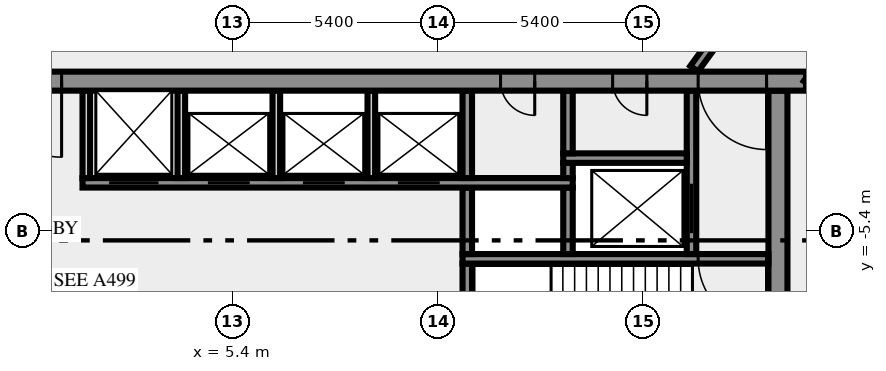
"""IFC4 building model, lengths in metres.
Left out: names, types, materials, properties, quantities, classifications, styles, units other than length and angle.
Written with IfcOpenShell. Run it as: python <this file> out.ifc"""

import sys

from ifc_helpers import new_model, si_unit, direction, frame, frame_2d, origin, place, context, subcontext, project, spatial, rectangle, extrude, element, fill, save


model = new_model("IFC4")
c1 = context("Model", 3, precision=1e-05, world=origin(), true_north=direction((0.0, 1.0)))
c2 = subcontext(c1, "Body", "Model", "MODEL_VIEW")
j1 = project(units=[si_unit("LENGTHUNIT", "METRE"), si_unit("PLANEANGLEUNIT", "RADIAN")], contexts=[c1])
p1 = place(None, origin())
s1 = spatial("IfcSite", under=j1, at=p1, CompositionType="ELEMENT")
p2 = place(p1, origin())
s2 = spatial("IfcBuilding", under=s1, at=p2, CompositionType="ELEMENT")
p3 = place(p2, frame((0.0, 0.0, 230.0)))
s3 = spatial("IfcBuildingStorey", under=s2, at=p3, CompositionType="ELEMENT", Elevation=230.0)
p4 = place(p3, frame((19.75, -10.5, 0.0), z_axis=(0.0, 0.0, 1.0), x_axis=(0.0, 1.0, 0.0)))
e1 = element("IfcWall", 1, at=p4, inside=s3, PredefinedType="SHEAR", context=c2, shape_type="SweptSolid", body=[
    extrude(rectangle(XDim=8.8, YDim=0.5, at=frame_2d((4.4, 0.0))), origin(), (0.0, 0.0, 1.0), 3.65),
])
p5 = place(p3, frame((11.575, -7.25, 0.0), z_axis=(0.0, 0.0, 1.0), x_axis=(0.0, 1.0, 0.0)))
e2 = element("IfcWall", 2, at=p5, inside=s3, PredefinedType="SHEAR", context=c2, shape_type="SweptSolid", body=[
    extrude(rectangle(XDim=1.0, YDim=0.25, at=frame_2d((0.5, 0.0))), origin(), (0.0, 0.0, 1.0), 3.65),
])
p6 = place(p3, frame((19.5, -6.125, 0.0), z_axis=(0.0, 0.0, 1.0), x_axis=(-1.0, 0.0, 0.0)))
e3 = element("IfcWall", 3, at=p6, inside=s3, PredefinedType="SHEAR", context=c2, shape_type="SweptSolid", body=[
    extrude(rectangle(XDim=8.05, YDim=0.25, at=frame_2d((4.025, 0.0))), origin(), (0.0, 0.0, 1.0), 3.65),
])
p7 = place(p6, frame((0.05, 0.0, 0.0)))
e4 = element("IfcOpeningElement", 4, at=p7, cuts=e3, PredefinedType="OPENING", context=c2, shape_type="SweptSolid", body=[
    extrude(rectangle(XDim=1.8, YDim=2.1, at=frame_2d((0.9, 1.05))), frame((0.0, 0.135, 0.0), z_axis=(0.0, -1.0, 0.0), x_axis=(1.0, 0.0, 0.0)), (0.0, 0.0, 1.0), 0.27),
])
for number, where, z_axis, x_axis in (
    (5, (11.575, -6.0, 0.0), (0.0, 0.0, 1.0), (0.0, 1.0, 0.0)),
    (6, (14.225, -6.0, 0.0), (0.0, 0.0, 1.0), (0.0, 1.0, 0.0)),
):
    element("IfcWall", number, at=place(p3, frame(where, z_axis=z_axis, x_axis=x_axis)), inside=s3, PredefinedType="SHEAR", context=c2, shape_type="SweptSolid", body=[
        extrude(rectangle(XDim=1.75, YDim=0.25, at=frame_2d((0.875, 0.0))), origin(), (0.0, 0.0, 1.0), 3.65),
    ])
p8 = place(p3, frame((17.475, -6.0, 0.0), z_axis=(0.0, 0.0, 1.0), x_axis=(0.0, 1.0, 0.0)))
e7 = element("IfcWall", 7, at=p8, inside=s3, PredefinedType="SHEAR", context=c2, shape_type="SweptSolid", body=[
    extrude(rectangle(XDim=4.3, YDim=0.25, at=frame_2d((2.15, 0.0))), origin(), (0.0, 0.0, 1.0), 3.65),
])
p9 = place(p8, frame((0.55, 0.0, 0.0)))
e8 = element("IfcOpeningElement", 8, at=p9, cuts=e7, PredefinedType="OPENING", context=c2, shape_type="SweptSolid", body=[
    extrude(rectangle(XDim=1.3, YDim=2.1, at=frame_2d((0.65, 1.05))), frame((0.0, 0.135, 0.0), z_axis=(0.0, -1.0, 0.0), x_axis=(1.0, 0.0, 0.0)), (0.0, 0.0, 1.0), 0.27),
])
p10 = place(p3, frame((1.45, -4.125, 0.0), z_axis=(0.0, 0.0, 1.0), x_axis=(1.0, 0.0, 0.0)))
e9 = element("IfcWall", 9, at=p10, inside=s3, PredefinedType="SHEAR", context=c2, shape_type="SweptSolid", body=[
    extrude(rectangle(XDim=12.9, YDim=0.25, at=frame_2d((6.45, 0.0))), origin(), (0.0, 0.0, 1.0), 3.65),
])
p11 = place(p10, frame((0.7, 0.0, 0.0)))
e10 = element("IfcOpeningElement", 10, at=p11, cuts=e9, PredefinedType="OPENING", context=c2, shape_type="SweptSolid", body=[
    extrude(rectangle(XDim=1.3, YDim=2.1, at=frame_2d((0.65, 1.05))), frame((0.0, 0.135, 0.0), z_axis=(0.0, -1.0, 0.0), x_axis=(1.0, 0.0, 0.0)), (0.0, 0.0, 1.0), 0.27),
])
p12 = place(p10, frame((3.3, 0.0, 0.0)))
e11 = element("IfcOpeningElement", 11, at=p12, cuts=e9, PredefinedType="OPENING", context=c2, shape_type="SweptSolid", body=[
    extrude(rectangle(XDim=1.1, YDim=2.1, at=frame_2d((0.55, 1.05))), frame((0.0, 0.135, 0.0), z_axis=(0.0, -1.0, 0.0), x_axis=(1.0, 0.0, 0.0)), (0.0, 0.0, 1.0), 0.27),
])
p13 = place(p10, frame((5.8, 0.0, 0.0)))
e12 = element("IfcOpeningElement", 12, at=p13, cuts=e9, PredefinedType="OPENING", context=c2, shape_type="SweptSolid", body=[
    extrude(rectangle(XDim=1.1, YDim=2.1, at=frame_2d((0.55, 1.05))), frame((0.0, 0.135, 0.0), z_axis=(0.0, -1.0, 0.0), x_axis=(1.0, 0.0, 0.0)), (0.0, 0.0, 1.0), 0.27),
])
p14 = place(p10, frame((8.3, 0.0, 0.0)))
e13 = element("IfcOpeningElement", 13, at=p14, cuts=e9, PredefinedType="OPENING", context=c2, shape_type="SweptSolid", body=[
    extrude(rectangle(XDim=1.1, YDim=2.1, at=frame_2d((0.55, 1.05))), frame((0.0, 0.135, 0.0), z_axis=(0.0, -1.0, 0.0), x_axis=(1.0, 0.0, 0.0)), (0.0, 0.0, 1.0), 0.27),
])
for number, where, z_axis, x_axis in (
    (14, (1.55, -4.0, 0.0), (0.0, 0.0, 1.0), (0.0, 1.0, 0.0)),
    (15, (4.05, -4.0, 0.0), (0.0, 0.0, 1.0), (0.0, 1.0, 0.0)),
    (16, (6.55, -4.0, 0.0), (0.0, 0.0, 1.0), (0.0, 1.0, 0.0)),
    (17, (9.05, -4.0, 0.0), (0.0, 0.0, 1.0), (0.0, 1.0, 0.0)),
):
    element("IfcWall", number, at=place(p3, frame(where, z_axis=z_axis, x_axis=x_axis)), inside=s3, PredefinedType="SOLIDWALL", context=c2, shape_type="SweptSolid", body=[
        extrude(rectangle(XDim=2.3, YDim=0.2, at=frame_2d((1.15, 0.0))), origin(), (0.0, 0.0, 1.0), 3.65),
    ])
p15 = place(p3, frame((11.575, -4.0, 0.0), z_axis=(0.0, 0.0, 1.0), x_axis=(0.0, 1.0, 0.0)))
e18 = element("IfcWall", 18, at=p15, inside=s3, PredefinedType="SHEAR", context=c2, shape_type="SweptSolid", body=[
    extrude(rectangle(XDim=2.3, YDim=0.25, at=frame_2d((1.15, 0.0))), origin(), (0.0, 0.0, 1.0), 3.65),
])
p16 = place(p3, frame((14.225, -4.0, 0.0), z_axis=(0.0, 0.0, 1.0), x_axis=(0.0, 1.0, 0.0)))
e19 = element("IfcWall", 19, at=p16, inside=s3, PredefinedType="SHEAR", context=c2, shape_type="SweptSolid", body=[
    extrude(rectangle(XDim=0.4, YDim=0.25, at=frame_2d((0.2, 0.0))), origin(), (0.0, 0.0, 1.0), 3.65),
])
p17 = place(p3, frame((14.1, -3.475, 0.0), z_axis=(0.0, 0.0, 1.0), x_axis=(1.0, 0.0, 0.0)))
e20 = element("IfcWall", 20, at=p17, inside=s3, PredefinedType="SHEAR", context=c2, shape_type="SweptSolid", body=[
    extrude(rectangle(XDim=3.25, YDim=0.25, at=frame_2d((1.625, 0.0))), origin(), (0.0, 0.0, 1.0), 3.65),
])
p18 = place(p3, frame((14.225, -3.35, 0.0), z_axis=(0.0, 0.0, 1.0), x_axis=(0.0, 1.0, 0.0)))
e21 = element("IfcWall", 21, at=p18, inside=s3, PredefinedType="SHEAR", context=c2, shape_type="SweptSolid", body=[
    extrude(rectangle(XDim=1.65, YDim=0.25, at=frame_2d((0.825, 0.0))), origin(), (0.0, 0.0, 1.0), 3.65),
])
p19 = place(p3, frame((20.49, -1.45, 0.0), z_axis=(0.0, 0.0, 1.0), x_axis=(-1.0, 0.0, 0.0)))
e22 = element("IfcWall", 22, at=p19, inside=s3, PredefinedType="SHEAR", context=c2, shape_type="SweptSolid", body=[
    extrude(rectangle(XDim=40.98, YDim=0.5, at=frame_2d((20.49, 0.0))), origin(), (0.0, 0.0, 1.0), 3.65),
])
p20 = place(p19, frame((38.14, 0.0, 0.0)))
e23 = element("IfcOpeningElement", 23, at=p20, cuts=e22, PredefinedType="OPENING", context=c2, shape_type="SweptSolid", body=[
    extrude(rectangle(XDim=1.8, YDim=2.1, at=frame_2d((0.9, 1.05))), frame((0.0, 0.26, 0.0), z_axis=(0.0, -1.0, 0.0), x_axis=(1.0, 0.0, 0.0)), (0.0, 0.0, 1.0), 0.52),
])
p21 = place(p19, frame((36.728, 0.0, 0.0)))
e24 = element("IfcOpeningElement", 24, at=p21, cuts=e22, PredefinedType="OPENING", context=c2, shape_type="SweptSolid", body=[
    extrude(rectangle(XDim=0.8, YDim=2.1, at=frame_2d((0.4, 1.05))), frame((0.0, 0.26, 0.0), z_axis=(0.0, -1.0, 0.0), x_axis=(1.0, 0.0, 0.0)), (0.0, 0.0, 1.0), 0.52),
])
p22 = place(p19, frame((35.153, 0.0, 0.0)))
e25 = element("IfcOpeningElement", 25, at=p22, cuts=e22, PredefinedType="OPENING", context=c2, shape_type="SweptSolid", body=[
    extrude(rectangle(XDim=0.8, YDim=2.1, at=frame_2d((0.4, 1.05))), frame((0.0, 0.26, 0.0), z_axis=(0.0, -1.0, 0.0), x_axis=(1.0, 0.0, 0.0)), (0.0, 0.0, 1.0), 0.52),
])
p23 = place(p19, frame((32.94, 0.0, 0.0)))
e26 = element("IfcOpeningElement", 26, at=p23, cuts=e22, PredefinedType="OPENING", context=c2, shape_type="SweptSolid", body=[
    extrude(rectangle(XDim=0.9, YDim=2.1, at=frame_2d((0.45, 1.05))), frame((0.0, 0.26, 0.0), z_axis=(0.0, -1.0, 0.0), x_axis=(1.0, 0.0, 0.0)), (0.0, 0.0, 1.0), 0.52),
])
p24 = place(p19, frame((29.603, 0.0, 0.0)))
e27 = element("IfcOpeningElement", 27, at=p24, cuts=e22, PredefinedType="OPENING", context=c2, shape_type="SweptSolid", body=[
    extrude(rectangle(XDim=0.9, YDim=2.1, at=frame_2d((0.45, 1.05))), frame((0.0, 0.26, 0.0), z_axis=(0.0, -1.0, 0.0), x_axis=(1.0, 0.0, 0.0)), (0.0, 0.0, 1.0), 0.52),
])
p25 = place(p19, frame((25.877, 0.0, 0.0)))
e28 = element("IfcOpeningElement", 28, at=p25, cuts=e22, PredefinedType="OPENING", context=c2, shape_type="SweptSolid", body=[
    extrude(rectangle(XDim=0.9, YDim=2.1, at=frame_2d((0.45, 1.05))), frame((0.0, 0.26, 0.0), z_axis=(0.0, -1.0, 0.0), x_axis=(1.0, 0.0, 0.0)), (0.0, 0.0, 1.0), 0.52),
])
p26 = place(p19, frame((19.59, 0.0, 0.0)))
e29 = element("IfcOpeningElement", 29, at=p26, cuts=e22, PredefinedType="OPENING", context=c2, shape_type="SweptSolid", body=[
    extrude(rectangle(XDim=2.0, YDim=2.1, at=frame_2d((1.0, 1.05))), frame((0.0, 0.26, 0.0), z_axis=(0.0, -1.0, 0.0), x_axis=(1.0, 0.0, 0.0)), (0.0, 0.0, 1.0), 0.52),
])
p27 = place(p19, frame((7.14, 0.0, 0.0)))
e30 = element("IfcOpeningElement", 30, at=p27, cuts=e22, PredefinedType="OPENING", context=c2, shape_type="SweptSolid", body=[
    extrude(rectangle(XDim=0.9, YDim=2.1, at=frame_2d((0.45, 1.05))), frame((0.0, 0.26, 0.0), z_axis=(0.0, -1.0, 0.0), x_axis=(1.0, 0.0, 0.0)), (0.0, 0.0, 1.0), 0.52),
])
p28 = place(p19, frame((4.19, 0.0, 0.0)))
e31 = element("IfcOpeningElement", 31, at=p28, cuts=e22, PredefinedType="OPENING", context=c2, shape_type="SweptSolid", body=[
    extrude(rectangle(XDim=0.9, YDim=2.1, at=frame_2d((0.45, 1.05))), frame((0.0, 0.26, 0.0), z_axis=(0.0, -1.0, 0.0), x_axis=(1.0, 0.0, 0.0)), (0.0, 0.0, 1.0), 0.52),
])
p29 = place(p19, frame((1.04, 0.0, 0.0)))
e32 = element("IfcOpeningElement", 32, at=p29, cuts=e22, PredefinedType="OPENING", context=c2, shape_type="SweptSolid", body=[
    extrude(rectangle(XDim=1.8, YDim=2.1, at=frame_2d((0.9, 1.05))), frame((0.0, 0.26, 0.0), z_axis=(0.0, -1.0, 0.0), x_axis=(1.0, 0.0, 0.0)), (0.0, 0.0, 1.0), 0.52),
])
p30 = place(p3, frame((17.545, -1.125, 0.0), z_axis=(0.0, 0.0, 1.0), x_axis=(0.587796810203, 0.809008596935, 0.0)))
e33 = element("IfcWall", 33, at=p30, inside=s3, PredefinedType="SOLIDWALL", context=c2, shape_type="SweptSolid", body=[
    extrude(rectangle(XDim=12.703, YDim=0.25, at=frame_2d((6.352, 0.0))), origin(), (0.0, 0.0, 1.0), 3.65),
])
p31 = place(p30, frame((11.329, 0.0, 0.0)))
e34 = element("IfcOpeningElement", 34, at=p31, cuts=e33, PredefinedType="OPENING", context=c2, shape_type="SweptSolid", body=[
    extrude(rectangle(XDim=0.9, YDim=2.1, at=frame_2d((0.45, 1.05))), frame((0.0, 0.135, 0.0), z_axis=(0.0, -1.0, 0.0), x_axis=(1.0, 0.0, 0.0)), (0.0, 0.0, 1.0), 0.27),
])
p32 = place(p3, frame((27.009, 7.392, 0.0), z_axis=(0.0, 0.0, 1.0), x_axis=(-0.587776457057, -0.809023384414, 0.0)))
e35 = element("IfcWall", 35, at=p32, inside=s3, PredefinedType="SOLIDWALL", context=c2, shape_type="SweptSolid", body=[
    extrude(rectangle(XDim=11.021, YDim=0.25, at=frame_2d((5.51, 0.0))), origin(), (0.0, 0.0, 1.0), 3.65),
])
p33 = place(p32, frame((3.905, 0.0, 0.0)))
e36 = element("IfcOpeningElement", 36, at=p33, cuts=e35, PredefinedType="OPENING", context=c2, shape_type="SweptSolid", body=[
    extrude(rectangle(XDim=0.9, YDim=2.1, at=frame_2d((0.45, 1.05))), frame((0.0, 0.135, 0.0), z_axis=(0.0, -1.0, 0.0), x_axis=(1.0, 0.0, 0.0)), (0.0, 0.0, 1.0), 0.27),
])
p34 = place(p32, frame((0.225, 0.0, 0.0)))
e37 = element("IfcOpeningElement", 37, at=p34, cuts=e35, PredefinedType="OPENING", context=c2, shape_type="SweptSolid", body=[
    extrude(rectangle(XDim=0.9, YDim=2.1, at=frame_2d((0.45, 1.05))), frame((0.0, 0.135, 0.0), z_axis=(0.0, -1.0, 0.0), x_axis=(1.0, 0.0, 0.0)), (0.0, 0.0, 1.0), 0.27),
])
p35 = place(p7, origin())
e38 = element("IfcDoor", 38, at=p35, inside=s3, OperationType="DOUBLE_DOOR_SINGLE_SWING", PredefinedType="DOOR", context=c2, shape_type="SweptSolid", body=[
    extrude(rectangle(XDim=1.8, YDim=2.1, at=frame_2d((0.9, 1.05))), frame((0.0, 0.025, 0.0), z_axis=(0.0, -1.0, 0.0), x_axis=(1.0, 0.0, 0.0)), (0.0, 0.0, 1.0), 0.05),
])
fill(e4, e38)
p36 = place(p9, origin())
e39 = element("IfcDoor", 39, at=p36, inside=s3, OperationType="DOUBLE_DOOR_SLIDING", PredefinedType="DOOR", context=c2, shape_type="SweptSolid", body=[
    extrude(rectangle(XDim=1.3, YDim=2.1, at=frame_2d((0.65, 1.05))), frame((0.0, 0.025, 0.0), z_axis=(0.0, -1.0, 0.0), x_axis=(1.0, 0.0, 0.0)), (0.0, 0.0, 1.0), 0.05),
])
fill(e8, e39)
p37 = place(p11, origin())
e40 = element("IfcDoor", 40, at=p37, inside=s3, OperationType="DOUBLE_DOOR_SLIDING", PredefinedType="DOOR", context=c2, shape_type="SweptSolid", body=[
    extrude(rectangle(XDim=1.3, YDim=2.1, at=frame_2d((0.65, 1.05))), frame((0.0, 0.025, 0.0), z_axis=(0.0, -1.0, 0.0), x_axis=(1.0, 0.0, 0.0)), (0.0, 0.0, 1.0), 0.05),
])
fill(e10, e40)
p38 = place(p12, origin())
e41 = element("IfcDoor", 41, at=p38, inside=s3, OperationType="DOUBLE_DOOR_SLIDING", PredefinedType="DOOR", context=c2, shape_type="SweptSolid", body=[
    extrude(rectangle(XDim=1.1, YDim=2.1, at=frame_2d((0.55, 1.05))), frame((0.0, 0.025, 0.0), z_axis=(0.0, -1.0, 0.0), x_axis=(1.0, 0.0, 0.0)), (0.0, 0.0, 1.0), 0.05),
])
fill(e11, e41)
p39 = place(p13, origin())
e42 = element("IfcDoor", 42, at=p39, inside=s3, OperationType="DOUBLE_DOOR_SLIDING", PredefinedType="DOOR", context=c2, shape_type="SweptSolid", body=[
    extrude(rectangle(XDim=1.1, YDim=2.1, at=frame_2d((0.55, 1.05))), frame((0.0, 0.025, 0.0), z_axis=(0.0, -1.0, 0.0), x_axis=(1.0, 0.0, 0.0)), (0.0, 0.0, 1.0), 0.05),
])
fill(e12, e42)
p40 = place(p14, origin())
e43 = element("IfcDoor", 43, at=p40, inside=s3, OperationType="DOUBLE_DOOR_SLIDING", PredefinedType="DOOR", context=c2, shape_type="SweptSolid", body=[
    extrude(rectangle(XDim=1.1, YDim=2.1, at=frame_2d((0.55, 1.05))), frame((0.0, 0.025, 0.0), z_axis=(0.0, -1.0, 0.0), x_axis=(1.0, 0.0, 0.0)), (0.0, 0.0, 1.0), 0.05),
])
fill(e13, e43)
p41 = place(p26, origin())
e44 = element("IfcDoor", 44, at=p41, inside=s3, OperationType="DOUBLE_DOOR_SINGLE_SWING", PredefinedType="DOOR", context=c2, shape_type="SweptSolid", body=[
    extrude(rectangle(XDim=2.0, YDim=2.1, at=frame_2d((1.0, 1.05))), frame((0.0, 0.025, 0.0), z_axis=(0.0, -1.0, 0.0), x_axis=(1.0, 0.0, 0.0)), (0.0, 0.0, 1.0), 0.05),
])
fill(e29, e44)
p42 = place(p27, origin())
e45 = element("IfcDoor", 45, at=p42, inside=s3, OperationType="SINGLE_SWING_LEFT", PredefinedType="DOOR", context=c2, shape_type="SweptSolid", body=[
    extrude(rectangle(XDim=0.9, YDim=2.1, at=frame_2d((0.45, 1.05))), frame((0.0, 0.025, 0.0), z_axis=(0.0, -1.0, 0.0), x_axis=(1.0, 0.0, 0.0)), (0.0, 0.0, 1.0), 0.05),
])
fill(e30, e45)
p43 = place(p28, origin())
e46 = element("IfcDoor", 46, at=p43, inside=s3, OperationType="SINGLE_SWING_LEFT", PredefinedType="DOOR", context=c2, shape_type="SweptSolid", body=[
    extrude(rectangle(XDim=0.9, YDim=2.1, at=frame_2d((0.45, 1.05))), frame((0.0, 0.025, 0.0), z_axis=(0.0, -1.0, 0.0), x_axis=(1.0, 0.0, 0.0)), (0.0, 0.0, 1.0), 0.05),
])
fill(e31, e46)
p44 = place(p29, origin())
e47 = element("IfcDoor", 47, at=p44, inside=s3, OperationType="DOUBLE_DOOR_SINGLE_SWING", PredefinedType="DOOR", context=c2, shape_type="SweptSolid", body=[
    extrude(rectangle(XDim=1.8, YDim=2.1, at=frame_2d((0.9, 1.05))), frame((0.0, 0.025, 0.0), z_axis=(0.0, -1.0, 0.0), x_axis=(1.0, 0.0, 0.0)), (0.0, 0.0, 1.0), 0.05),
])
fill(e32, e47)
save(model, sys.argv[1])
